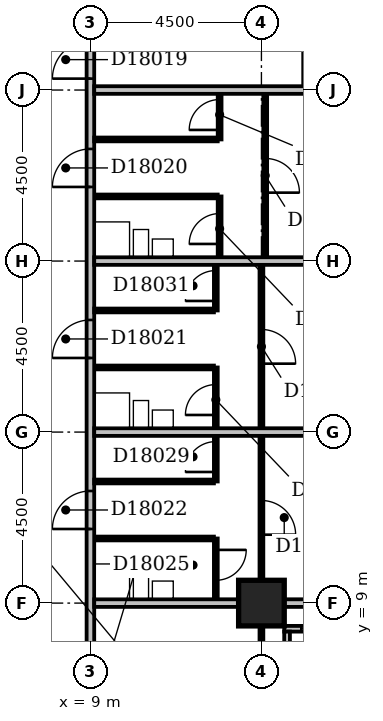
"""IFC4 building model, lengths in metres.
Left out: names, types, materials, properties, quantities, classifications, styles, units other than length and angle.
Written with IfcOpenShell. Run it as: python <this file> out.ifc"""

import sys

from ifc_helpers import new_model, si_unit, direction, frame, frame_2d, origin, origin_2d, place, context, subcontext, project, spatial, rectangle, extrude, element, fill, save


model = new_model("IFC4")
c1 = context("Model", 3, precision=1e-05, world=origin(), true_north=direction((0.0, 1.0)))
c2 = subcontext(c1, "Body", "Model", "MODEL_VIEW")
j1 = project(units=[si_unit("LENGTHUNIT", "METRE"), si_unit("PLANEANGLEUNIT", "RADIAN")], contexts=[c1])
p1 = place(None, origin())
s1 = spatial("IfcSite", under=j1, at=p1, CompositionType="ELEMENT")
p2 = place(p1, origin())
s2 = spatial("IfcBuilding", under=s1, at=p2, CompositionType="ELEMENT")
p3 = place(p2, frame((0.0, 0.0, 75.8)))
s3 = spatial("IfcBuildingStorey", under=s2, at=p3, CompositionType="ELEMENT", Elevation=75.8)
p4 = place(p3, frame((13.5, 9.0, -0.3), z_axis=(0.0, 0.0, 1.0), x_axis=(1.0, 0.0, 0.0)))
e1 = element("IfcColumn", 1, at=p4, inside=s3, PredefinedType="COLUMN", context=c2, shape_type="SweptSolid", body=[
    extrude(rectangle(XDim=1.2, YDim=1.2, at=origin_2d()), origin(), (0.0, 0.0, 1.0), 3.6),
])
p5 = place(p3, frame((14.175, 3.9, 0.0), z_axis=(0.0, 0.0, 1.0), x_axis=(0.0, 1.0, 0.0)))
e2 = element("IfcWall", 2, at=p5, inside=s3, PredefinedType="STANDARD", context=c2, shape_type="SweptSolid", body=[
    extrude(rectangle(XDim=4.35, YDim=0.15, at=frame_2d((2.175, 0.0))), origin(), (0.0, 0.0, 1.0), 2.7),
])
p6 = place(p5, frame((1.65, 0.0, 0.6)))
e3 = element("IfcOpeningElement", 3, at=p6, cuts=e2, PredefinedType="OPENING", context=c2, shape_type="SweptSolid", body=[
    extrude(rectangle(XDim=2.4, YDim=1.8, at=frame_2d((1.2, 0.9))), frame((0.0, 0.087, 0.0), z_axis=(0.0, -1.0, 0.0), x_axis=(1.0, 0.0, 0.0)), (0.0, 0.0, 1.0), 0.174),
])
p7 = place(p3, frame((14.1, 8.325, 0.0), z_axis=(0.0, 0.0, 1.0), x_axis=(1.0, 0.0, 0.0)))
e4 = element("IfcWall", 4, at=p7, inside=s3, PredefinedType="STANDARD", context=c2, shape_type="SweptSolid", body=[
    extrude(rectangle(XDim=4.65, YDim=0.15, at=frame_2d((2.325, 0.0))), origin(), (0.0, 0.0, 1.0), 2.7),
])
p8 = place(p7, frame((0.45, 0.0, 0.6)))
e5 = element("IfcOpeningElement", 5, at=p8, cuts=e4, PredefinedType="OPENING", context=c2, shape_type="SweptSolid", body=[
    extrude(rectangle(XDim=2.4, YDim=1.8, at=frame_2d((1.2, 0.9))), frame((0.0, 0.087, 0.0), z_axis=(0.0, -1.0, 0.0), x_axis=(1.0, 0.0, 0.0)), (0.0, 0.0, 1.0), 0.174),
])
p9 = place(p3, frame((9.0, 5.0, 0.0), z_axis=(0.0, 0.0, 1.0), x_axis=(0.0, 1.0, 0.0)))
e6 = element("IfcWall", 6, at=p9, inside=s3, PredefinedType="PARTITIONING", context=c2, shape_type="SweptSolid", body=[
    extrude(rectangle(XDim=44.5, YDim=0.2, at=frame_2d((22.25, 0.0))), origin(), (0.0, 0.0, 1.0), 3.3),
])
p10 = place(p9, frame((17.8, 0.0, 0.0)))
e7 = element("IfcOpeningElement", 7, at=p10, cuts=e6, PredefinedType="OPENING", context=c2, shape_type="SweptSolid", body=[
    extrude(rectangle(XDim=1.0, YDim=2.1, at=frame_2d((0.5, 1.05))), frame((0.0, 0.112, 0.0), z_axis=(0.0, -1.0, 0.0), x_axis=(1.0, 0.0, 0.0)), (0.0, 0.0, 1.0), 0.224),
])
p11 = place(p9, frame((14.95, 0.0, 0.0)))
e8 = element("IfcOpeningElement", 8, at=p11, cuts=e6, PredefinedType="OPENING", context=c2, shape_type="SweptSolid", body=[
    extrude(rectangle(XDim=1.0, YDim=2.1, at=frame_2d((0.5, 1.05))), frame((0.0, 0.112, 0.0), z_axis=(0.0, -1.0, 0.0), x_axis=(1.0, 0.0, 0.0)), (0.0, 0.0, 1.0), 0.224),
])
p12 = place(p9, frame((10.45, 0.0, 0.0)))
e9 = element("IfcOpeningElement", 9, at=p12, cuts=e6, PredefinedType="OPENING", context=c2, shape_type="SweptSolid", body=[
    extrude(rectangle(XDim=1.0, YDim=2.1, at=frame_2d((0.5, 1.05))), frame((0.0, 0.112, 0.0), z_axis=(0.0, -1.0, 0.0), x_axis=(1.0, 0.0, 0.0)), (0.0, 0.0, 1.0), 0.224),
])
p13 = place(p9, frame((5.95, 0.0, 0.0)))
e10 = element("IfcOpeningElement", 10, at=p13, cuts=e6, PredefinedType="OPENING", context=c2, shape_type="SweptSolid", body=[
    extrude(rectangle(XDim=1.0, YDim=2.1, at=frame_2d((0.5, 1.05))), frame((0.0, 0.112, 0.0), z_axis=(0.0, -1.0, 0.0), x_axis=(1.0, 0.0, 0.0)), (0.0, 0.0, 1.0), 0.224),
])
p14 = place(p9, frame((35.0, 0.0, 0.0)))
e11 = element("IfcOpeningElement", 11, at=p14, cuts=e6, PredefinedType="OPENING", context=c2, shape_type="SweptSolid", body=[
    extrude(rectangle(XDim=0.9, YDim=2.1, at=frame_2d((0.45, 1.05))), frame((0.0, 0.112, 0.0), z_axis=(0.0, -1.0, 0.0), x_axis=(1.0, 0.0, 0.0)), (0.0, 0.0, 1.0), 0.224),
])
p15 = place(p9, frame((1.5, 0.0, 0.0)))
e12 = element("IfcOpeningElement", 12, at=p15, cuts=e6, PredefinedType="OPENING", context=c2, shape_type="SweptSolid", body=[
    extrude(rectangle(XDim=0.9, YDim=2.1, at=frame_2d((0.45, 1.05))), frame((0.0, 0.112, 0.0), z_axis=(0.0, -1.0, 0.0), x_axis=(1.0, 0.0, 0.0)), (0.0, 0.0, 1.0), 0.224),
])
p16 = place(p3, frame((13.5, 5.1, 0.0), z_axis=(0.0, 0.0, 1.0), x_axis=(0.0, 1.0, 0.0)))
e13 = element("IfcWall", 13, at=p16, inside=s3, PredefinedType="PARTITIONING", context=c2, shape_type="SweptSolid", body=[
    extrude(rectangle(XDim=3.3, YDim=0.1, at=frame_2d((1.65, 0.0))), origin(), (0.0, 0.0, 1.0), 2.7),
])
p17 = place(p3, frame((9.1, 9.0, 0.0), z_axis=(0.0, 0.0, 1.0), x_axis=(1.0, 0.0, 0.0)))
e14 = element("IfcWall", 14, at=p17, inside=s3, PredefinedType="PARTITIONING", context=c2, shape_type="SweptSolid", body=[
    extrude(rectangle(XDim=3.8, YDim=0.2, at=frame_2d((1.9, 0.0))), origin(), (0.0, 0.0, 1.0), 3.3),
])
p18 = place(p3, frame((14.1, 9.0, 0.0), z_axis=(0.0, 0.0, 1.0), x_axis=(1.0, 0.0, 0.0)))
e15 = element("IfcWall", 15, at=p18, inside=s3, PredefinedType="PARTITIONING", context=c2, shape_type="SweptSolid", body=[
    extrude(rectangle(XDim=3.3, YDim=0.2, at=frame_2d((1.65, 0.0))), origin(), (0.0, 0.0, 1.0), 2.7),
])
p19 = place(p3, frame((12.3, 9.1, 0.0), z_axis=(0.0, 0.0, 1.0), x_axis=(0.0, 1.0, 0.0)))
e16 = element("IfcWall", 16, at=p19, inside=s3, PredefinedType="PARTITIONING", context=c2, shape_type="SweptSolid", body=[
    extrude(rectangle(XDim=1.6, YDim=0.1, at=frame_2d((0.8, 0.0))), origin(), (0.0, 0.0, 1.0), 3.3),
])
p20 = place(p19, frame((0.5, 0.0, 0.0)))
e17 = element("IfcOpeningElement", 17, at=p20, cuts=e16, PredefinedType="OPENING", context=c2, shape_type="SweptSolid", body=[
    extrude(rectangle(XDim=0.8, YDim=2.1, at=frame_2d((0.4, 1.05))), frame((0.0, 0.062, 0.0), z_axis=(0.0, -1.0, 0.0), x_axis=(1.0, 0.0, 0.0)), (0.0, 0.0, 1.0), 0.124),
])
p21 = place(p3, frame((13.5, 9.6, 0.0), z_axis=(0.0, 0.0, 1.0), x_axis=(0.0, 1.0, 0.0)))
e18 = element("IfcWall", 18, at=p21, inside=s3, PredefinedType="PARTITIONING", context=c2, shape_type="SweptSolid", body=[
    extrude(rectangle(XDim=8.3, YDim=0.1, at=frame_2d((4.15, 0.0))), origin(), (0.0, 0.0, 1.0), 3.3),
])
p22 = place(p21, frame((5.7, 0.0, 0.0)))
e19 = element("IfcOpeningElement", 19, at=p22, cuts=e18, PredefinedType="OPENING", context=c2, shape_type="SweptSolid", body=[
    extrude(rectangle(XDim=0.9, YDim=2.1, at=frame_2d((0.45, 1.05))), frame((0.0, 0.062, 0.0), z_axis=(0.0, -1.0, 0.0), x_axis=(1.0, 0.0, 0.0)), (0.0, 0.0, 1.0), 0.124),
])
p23 = place(p21, frame((1.2, 0.0, 0.0)))
e20 = element("IfcOpeningElement", 20, at=p23, cuts=e18, PredefinedType="OPENING", context=c2, shape_type="SweptSolid", body=[
    extrude(rectangle(XDim=0.9, YDim=2.1, at=frame_2d((0.45, 1.05))), frame((0.0, 0.062, 0.0), z_axis=(0.0, -1.0, 0.0), x_axis=(1.0, 0.0, 0.0)), (0.0, 0.0, 1.0), 0.124),
])
p24 = place(p3, frame((9.1, 10.7, 0.0), z_axis=(0.0, 0.0, 1.0), x_axis=(1.0, 0.0, 0.0)))
e21 = element("IfcWall", 21, at=p24, inside=s3, PredefinedType="PLUMBINGWALL", context=c2, shape_type="SweptSolid", body=[
    extrude(rectangle(XDim=3.15, YDim=0.1, at=frame_2d((1.575, 0.0))), origin(), (0.0, 0.0, 1.0), 3.3),
])
p25 = place(p3, frame((9.1, 12.2, 0.0), z_axis=(0.0, 0.0, 1.0), x_axis=(1.0, 0.0, 0.0)))
e22 = element("IfcWall", 22, at=p25, inside=s3, PredefinedType="PARTITIONING", context=c2, shape_type="SweptSolid", body=[
    extrude(rectangle(XDim=3.15, YDim=0.1, at=frame_2d((1.575, 0.0))), origin(), (0.0, 0.0, 1.0), 3.3),
])
p26 = place(p3, frame((12.3, 12.2, 0.0), z_axis=(0.0, 0.0, 1.0), x_axis=(0.0, 1.0, 0.0)))
e23 = element("IfcWall", 23, at=p26, inside=s3, PredefinedType="PARTITIONING", context=c2, shape_type="SweptSolid", body=[
    extrude(rectangle(XDim=3.0, YDim=0.1, at=frame_2d((1.5, 0.0))), origin(), (0.0, 0.0, 1.0), 3.3),
])
p27 = place(p26, frame((1.75, 0.0, 0.0)))
e24 = element("IfcOpeningElement", 24, at=p27, cuts=e23, PredefinedType="OPENING", context=c2, shape_type="SweptSolid", body=[
    extrude(rectangle(XDim=0.8, YDim=2.1, at=frame_2d((0.4, 1.05))), frame((0.0, 0.062, 0.0), z_axis=(0.0, -1.0, 0.0), x_axis=(1.0, 0.0, 0.0)), (0.0, 0.0, 1.0), 0.124),
])
p28 = place(p26, frame((0.25, 0.0, 0.0)))
e25 = element("IfcOpeningElement", 25, at=p28, cuts=e23, PredefinedType="OPENING", context=c2, shape_type="SweptSolid", body=[
    extrude(rectangle(XDim=0.8, YDim=2.1, at=frame_2d((0.4, 1.05))), frame((0.0, 0.062, 0.0), z_axis=(0.0, -1.0, 0.0), x_axis=(1.0, 0.0, 0.0)), (0.0, 0.0, 1.0), 0.124),
])
p29 = place(p3, frame((9.1, 13.5, 0.0), z_axis=(0.0, 0.0, 1.0), x_axis=(1.0, 0.0, 0.0)))
e26 = element("IfcWall", 26, at=p29, inside=s3, PredefinedType="PARTITIONING", context=c2, shape_type="SweptSolid", body=[
    extrude(rectangle(XDim=8.3, YDim=0.2, at=frame_2d((4.15, 0.0))), origin(), (0.0, 0.0, 1.0), 3.3),
])
p30 = place(p3, frame((9.1, 15.2, 0.0), z_axis=(0.0, 0.0, 1.0), x_axis=(1.0, 0.0, 0.0)))
e27 = element("IfcWall", 27, at=p30, inside=s3, PredefinedType="PLUMBINGWALL", context=c2, shape_type="SweptSolid", body=[
    extrude(rectangle(XDim=3.15, YDim=0.1, at=frame_2d((1.575, 0.0))), origin(), (0.0, 0.0, 1.0), 3.3),
])
p31 = place(p3, frame((9.1, 16.7, 0.0), z_axis=(0.0, 0.0, 1.0), x_axis=(1.0, 0.0, 0.0)))
e28 = element("IfcWall", 28, at=p31, inside=s3, PredefinedType="PARTITIONING", context=c2, shape_type="SweptSolid", body=[
    extrude(rectangle(XDim=3.15, YDim=0.1, at=frame_2d((1.575, 0.0))), origin(), (0.0, 0.0, 1.0), 3.3),
])
p32 = place(p3, frame((12.3, 16.7, 0.0), z_axis=(0.0, 0.0, 1.0), x_axis=(0.0, 1.0, 0.0)))
e29 = element("IfcWall", 29, at=p32, inside=s3, PredefinedType="PARTITIONING", context=c2, shape_type="SweptSolid", body=[
    extrude(rectangle(XDim=1.2, YDim=0.1, at=frame_2d((0.6, 0.0))), origin(), (0.0, 0.0, 1.0), 3.3),
])
p33 = place(p32, frame((0.25, 0.0, 0.0)))
e30 = element("IfcOpeningElement", 30, at=p33, cuts=e29, PredefinedType="OPENING", context=c2, shape_type="SweptSolid", body=[
    extrude(rectangle(XDim=0.8, YDim=2.1, at=frame_2d((0.4, 1.05))), frame((0.0, 0.062, 0.0), z_axis=(0.0, -1.0, 0.0), x_axis=(1.0, 0.0, 0.0)), (0.0, 0.0, 1.0), 0.124),
])
p34 = place(p3, frame((9.1, 18.0, 0.0), z_axis=(0.0, 0.0, 1.0), x_axis=(1.0, 0.0, 0.0)))
e31 = element("IfcWall", 31, at=p34, inside=s3, PredefinedType="PARTITIONING", context=c2, shape_type="SweptSolid", body=[
    extrude(rectangle(XDim=8.3, YDim=0.2, at=frame_2d((4.15, 0.0))), origin(), (0.0, 0.0, 1.0), 2.6),
])
p35 = place(p3, frame((12.4, 18.1, 0.0), z_axis=(0.0, 0.0, 1.0), x_axis=(0.0, 1.0, 0.0)))
e32 = element("IfcWall", 32, at=p35, inside=s3, PredefinedType="PARTITIONING", context=c2, shape_type="SweptSolid", body=[
    extrude(rectangle(XDim=1.6, YDim=0.1, at=frame_2d((0.8, 0.0))), origin(), (0.0, 0.0, 1.0), 3.3),
])
p36 = place(p35, frame((0.35, 0.0, 0.0)))
e33 = element("IfcOpeningElement", 33, at=p36, cuts=e32, PredefinedType="OPENING", context=c2, shape_type="SweptSolid", body=[
    extrude(rectangle(XDim=0.8, YDim=2.1, at=frame_2d((0.4, 1.05))), frame((0.0, 0.062, 0.0), z_axis=(0.0, -1.0, 0.0), x_axis=(1.0, 0.0, 0.0)), (0.0, 0.0, 1.0), 0.124),
])
p37 = place(p3, frame((13.6, 18.1, 0.0), z_axis=(0.0, 0.0, 1.0), x_axis=(0.0, 1.0, 0.0)))
e34 = element("IfcWall", 34, at=p37, inside=s3, PredefinedType="PARTITIONING", context=c2, shape_type="SweptSolid", body=[
    extrude(rectangle(XDim=4.3, YDim=0.1, at=frame_2d((2.15, 0.0))), origin(), (0.0, 0.0, 1.0), 3.3),
])
p38 = place(p37, frame((1.7, 0.0, 0.0)))
e35 = element("IfcOpeningElement", 35, at=p38, cuts=e34, PredefinedType="OPENING", context=c2, shape_type="SweptSolid", body=[
    extrude(rectangle(XDim=0.9, YDim=2.1, at=frame_2d((0.45, 1.05))), frame((0.0, 0.062, 0.0), z_axis=(0.0, -1.0, 0.0), x_axis=(1.0, 0.0, 0.0)), (0.0, 0.0, 1.0), 0.124),
])
p39 = place(p3, frame((9.1, 19.7, 0.0), z_axis=(0.0, 0.0, 1.0), x_axis=(1.0, 0.0, 0.0)))
e36 = element("IfcWall", 36, at=p39, inside=s3, PredefinedType="PLUMBINGWALL", context=c2, shape_type="SweptSolid", body=[
    extrude(rectangle(XDim=3.25, YDim=0.1, at=frame_2d((1.625, 0.0))), origin(), (0.0, 0.0, 1.0), 3.3),
])
p40 = place(p3, frame((9.1, 21.2, 0.0), z_axis=(0.0, 0.0, 1.0), x_axis=(1.0, 0.0, 0.0)))
e37 = element("IfcWall", 37, at=p40, inside=s3, PredefinedType="PARTITIONING", context=c2, shape_type="SweptSolid", body=[
    extrude(rectangle(XDim=3.25, YDim=0.1, at=frame_2d((1.625, 0.0))), origin(), (0.0, 0.0, 1.0), 3.3),
])
p41 = place(p3, frame((12.4, 21.2, 0.0), z_axis=(0.0, 0.0, 1.0), x_axis=(0.0, 1.0, 0.0)))
e38 = element("IfcWall", 38, at=p41, inside=s3, PredefinedType="PARTITIONING", context=c2, shape_type="SweptSolid", body=[
    extrude(rectangle(XDim=1.2, YDim=0.1, at=frame_2d((0.6, 0.0))), origin(), (0.0, 0.0, 1.0), 3.3),
])
p42 = place(p41, frame((0.25, 0.0, 0.0)))
e39 = element("IfcOpeningElement", 39, at=p42, cuts=e38, PredefinedType="OPENING", context=c2, shape_type="SweptSolid", body=[
    extrude(rectangle(XDim=0.8, YDim=2.1, at=frame_2d((0.4, 1.05))), frame((0.0, 0.062, 0.0), z_axis=(0.0, -1.0, 0.0), x_axis=(1.0, 0.0, 0.0)), (0.0, 0.0, 1.0), 0.124),
])
p43 = place(p3, frame((9.1, 22.5, 0.0), z_axis=(0.0, 0.0, 1.0), x_axis=(1.0, 0.0, 0.0)))
e40 = element("IfcWall", 40, at=p43, inside=s3, PredefinedType="PARTITIONING", context=c2, shape_type="SweptSolid", body=[
    extrude(rectangle(XDim=12.8, YDim=0.2, at=frame_2d((6.4, 0.0))), origin(), (0.0, 0.0, 1.0), 3.3),
])
p44 = place(p3, frame((14.65, 22.6, 0.0), z_axis=(0.0, 0.0, 1.0), x_axis=(0.0, 1.0, 0.0)))
e41 = element("IfcWall", 41, at=p44, inside=s3, PredefinedType="PARTITIONING", context=c2, shape_type="SweptSolid", body=[
    extrude(rectangle(XDim=13.3, YDim=0.1, at=frame_2d((6.65, 0.0))), origin(), (0.0, 0.0, 1.0), 3.3),
])
p45 = place(p44, frame((1.7, 0.0, 0.0)))
e42 = element("IfcOpeningElement", 42, at=p45, cuts=e41, PredefinedType="OPENING", context=c2, shape_type="SweptSolid", body=[
    extrude(rectangle(XDim=0.9, YDim=2.1, at=frame_2d((0.45, 1.05))), frame((0.0, 0.062, 0.0), z_axis=(0.0, -1.0, 0.0), x_axis=(1.0, 0.0, 0.0)), (0.0, 0.0, 1.0), 0.124),
])
p46 = place(p44, frame((6.2, 0.0, 0.0)))
e43 = element("IfcOpeningElement", 43, at=p46, cuts=e41, PredefinedType="OPENING", context=c2, shape_type="SweptSolid", body=[
    extrude(rectangle(XDim=0.9, YDim=2.1, at=frame_2d((0.45, 1.05))), frame((0.0, 0.062, 0.0), z_axis=(0.0, -1.0, 0.0), x_axis=(1.0, 0.0, 0.0)), (0.0, 0.0, 1.0), 0.124),
])
p47 = place(p44, frame((10.7, 0.0, 0.0)))
e44 = element("IfcOpeningElement", 44, at=p47, cuts=e41, PredefinedType="OPENING", context=c2, shape_type="SweptSolid", body=[
    extrude(rectangle(XDim=0.9, YDim=2.1, at=frame_2d((0.45, 1.05))), frame((0.0, 0.062, 0.0), z_axis=(0.0, -1.0, 0.0), x_axis=(1.0, 0.0, 0.0)), (0.0, 0.0, 1.0), 0.124),
])
p48 = place(p8, origin())
e45 = element("IfcWindow", 45, at=p48, inside=s3, PartitioningType="SINGLE_PANEL", PredefinedType="WINDOW", context=c2, shape_type="SweptSolid", body=[
    extrude(rectangle(XDim=2.4, YDim=1.8, at=frame_2d((1.2, 0.9))), frame((0.0, 0.03, 0.0), z_axis=(0.0, -1.0, 0.0), x_axis=(1.0, 0.0, 0.0)), (0.0, 0.0, 1.0), 0.06),
])
fill(e5, e45)
p49 = place(p10, origin())
e46 = element("IfcDoor", 46, at=p49, inside=s3, OperationType="SINGLE_SWING_LEFT", PredefinedType="DOOR", context=c2, shape_type="SweptSolid", body=[
    extrude(rectangle(XDim=1.0, YDim=2.1, at=frame_2d((0.5, 1.05))), frame((0.0, 0.025, 0.0), z_axis=(0.0, -1.0, 0.0), x_axis=(1.0, 0.0, 0.0)), (0.0, 0.0, 1.0), 0.05),
])
fill(e7, e46)
p50 = place(p11, origin())
e47 = element("IfcDoor", 47, at=p50, inside=s3, OperationType="SINGLE_SWING_LEFT", PredefinedType="DOOR", context=c2, shape_type="SweptSolid", body=[
    extrude(rectangle(XDim=1.0, YDim=2.1, at=frame_2d((0.5, 1.05))), frame((0.0, 0.025, 0.0), z_axis=(0.0, -1.0, 0.0), x_axis=(1.0, 0.0, 0.0)), (0.0, 0.0, 1.0), 0.05),
])
fill(e8, e47)
p51 = place(p12, origin())
e48 = element("IfcDoor", 48, at=p51, inside=s3, OperationType="SINGLE_SWING_LEFT", PredefinedType="DOOR", context=c2, shape_type="SweptSolid", body=[
    extrude(rectangle(XDim=1.0, YDim=2.1, at=frame_2d((0.5, 1.05))), frame((0.0, 0.025, 0.0), z_axis=(0.0, -1.0, 0.0), x_axis=(1.0, 0.0, 0.0)), (0.0, 0.0, 1.0), 0.05),
])
fill(e9, e48)
p52 = place(p13, origin())
e49 = element("IfcDoor", 49, at=p52, inside=s3, OperationType="SINGLE_SWING_LEFT", PredefinedType="DOOR", context=c2, shape_type="SweptSolid", body=[
    extrude(rectangle(XDim=1.0, YDim=2.1, at=frame_2d((0.5, 1.05))), frame((0.0, 0.025, 0.0), z_axis=(0.0, -1.0, 0.0), x_axis=(1.0, 0.0, 0.0)), (0.0, 0.0, 1.0), 0.05),
])
fill(e10, e49)
p53 = place(p20, origin())
e50 = element("IfcDoor", 50, at=p53, inside=s3, OperationType="SINGLE_SWING_RIGHT", PredefinedType="DOOR", context=c2, shape_type="SweptSolid", body=[
    extrude(rectangle(XDim=0.8, YDim=2.1, at=frame_2d((0.4, 1.05))), frame((0.0, 0.025, 0.0), z_axis=(0.0, -1.0, 0.0), x_axis=(1.0, 0.0, 0.0)), (0.0, 0.0, 1.0), 0.05),
])
fill(e17, e50)
p54 = place(p22, frame((0.9, 0.0, 0.0), z_axis=(0.0, 0.0, 1.0), x_axis=(-1.0, 0.0, 0.0)))
e51 = element("IfcDoor", 51, at=p54, inside=s3, OperationType="SINGLE_SWING_RIGHT", PredefinedType="DOOR", context=c2, shape_type="SweptSolid", body=[
    extrude(rectangle(XDim=0.9, YDim=2.1, at=frame_2d((0.45, 1.05))), frame((0.0, 0.025, 0.0), z_axis=(0.0, -1.0, 0.0), x_axis=(1.0, 0.0, 0.0)), (0.0, 0.0, 1.0), 0.05),
])
fill(e19, e51)
p55 = place(p23, frame((0.9, 0.0, 0.0), z_axis=(0.0, 0.0, 1.0), x_axis=(-1.0, 0.0, 0.0)))
e52 = element("IfcDoor", 52, at=p55, inside=s3, OperationType="SINGLE_SWING_RIGHT", PredefinedType="DOOR", context=c2, shape_type="SweptSolid", body=[
    extrude(rectangle(XDim=0.9, YDim=2.1, at=frame_2d((0.45, 1.05))), frame((0.0, 0.025, 0.0), z_axis=(0.0, -1.0, 0.0), x_axis=(1.0, 0.0, 0.0)), (0.0, 0.0, 1.0), 0.05),
])
fill(e20, e52)
p56 = place(p27, origin())
e53 = element("IfcDoor", 53, at=p56, inside=s3, OperationType="SINGLE_SWING_LEFT", PredefinedType="DOOR", context=c2, shape_type="SweptSolid", body=[
    extrude(rectangle(XDim=0.8, YDim=2.1, at=frame_2d((0.4, 1.05))), frame((0.0, 0.025, 0.0), z_axis=(0.0, -1.0, 0.0), x_axis=(1.0, 0.0, 0.0)), (0.0, 0.0, 1.0), 0.05),
])
fill(e24, e53)
p57 = place(p28, origin())
e54 = element("IfcDoor", 54, at=p57, inside=s3, OperationType="SINGLE_SWING_LEFT", PredefinedType="DOOR", context=c2, shape_type="SweptSolid", body=[
    extrude(rectangle(XDim=0.8, YDim=2.1, at=frame_2d((0.4, 1.05))), frame((0.0, 0.025, 0.0), z_axis=(0.0, -1.0, 0.0), x_axis=(1.0, 0.0, 0.0)), (0.0, 0.0, 1.0), 0.05),
])
fill(e25, e54)
p58 = place(p33, origin())
e55 = element("IfcDoor", 55, at=p58, inside=s3, OperationType="SINGLE_SWING_LEFT", PredefinedType="DOOR", context=c2, shape_type="SweptSolid", body=[
    extrude(rectangle(XDim=0.8, YDim=2.1, at=frame_2d((0.4, 1.05))), frame((0.0, 0.025, 0.0), z_axis=(0.0, -1.0, 0.0), x_axis=(1.0, 0.0, 0.0)), (0.0, 0.0, 1.0), 0.05),
])
fill(e30, e55)
p59 = place(p36, origin())
e56 = element("IfcDoor", 56, at=p59, inside=s3, OperationType="SINGLE_SWING_LEFT", PredefinedType="DOOR", context=c2, shape_type="SweptSolid", body=[
    extrude(rectangle(XDim=0.8, YDim=2.1, at=frame_2d((0.4, 1.05))), frame((0.0, 0.025, 0.0), z_axis=(0.0, -1.0, 0.0), x_axis=(1.0, 0.0, 0.0)), (0.0, 0.0, 1.0), 0.05),
])
fill(e33, e56)
p60 = place(p38, frame((0.9, 0.0, 0.0), z_axis=(0.0, 0.0, 1.0), x_axis=(-1.0, 0.0, 0.0)))
e57 = element("IfcDoor", 57, at=p60, inside=s3, OperationType="SINGLE_SWING_RIGHT", PredefinedType="DOOR", context=c2, shape_type="SweptSolid", body=[
    extrude(rectangle(XDim=0.9, YDim=2.1, at=frame_2d((0.45, 1.05))), frame((0.0, 0.025, 0.0), z_axis=(0.0, -1.0, 0.0), x_axis=(1.0, 0.0, 0.0)), (0.0, 0.0, 1.0), 0.05),
])
fill(e35, e57)
p61 = place(p42, origin())
e58 = element("IfcDoor", 58, at=p61, inside=s3, OperationType="SINGLE_SWING_LEFT", PredefinedType="DOOR", context=c2, shape_type="SweptSolid", body=[
    extrude(rectangle(XDim=0.8, YDim=2.1, at=frame_2d((0.4, 1.05))), frame((0.0, 0.025, 0.0), z_axis=(0.0, -1.0, 0.0), x_axis=(1.0, 0.0, 0.0)), (0.0, 0.0, 1.0), 0.05),
])
fill(e39, e58)
save(model, sys.argv[1])
